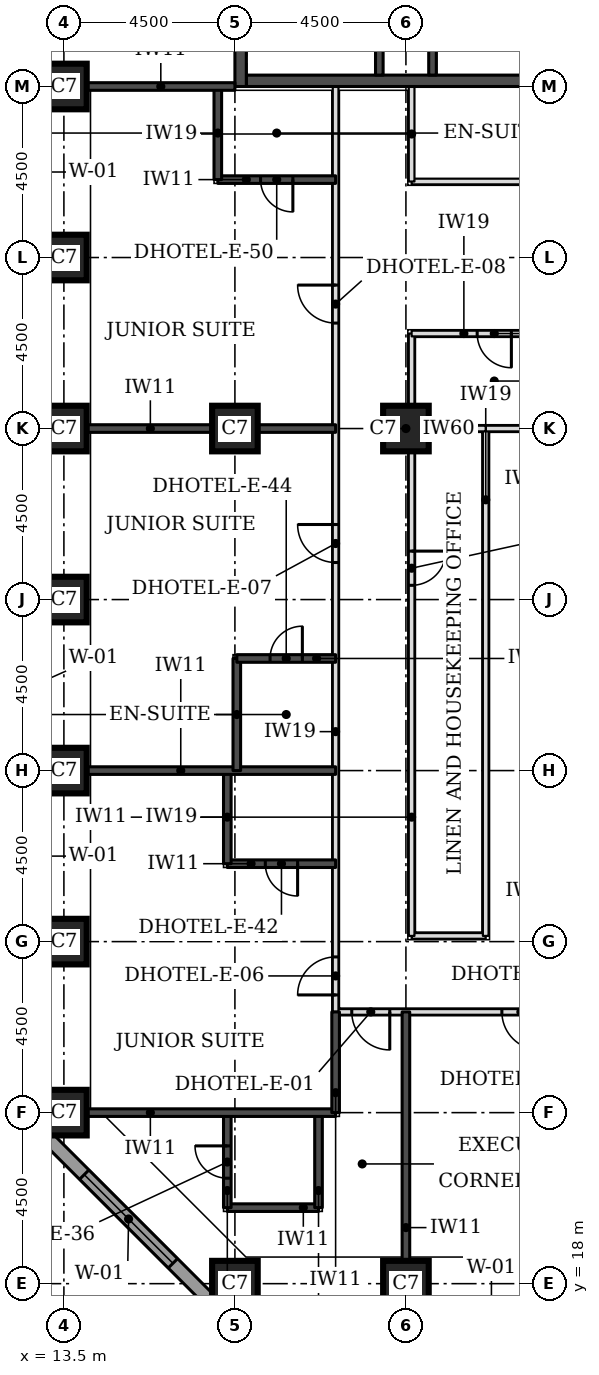
"""IFC4 building model, lengths in metres.
Left out: names, types, materials, properties, quantities, classifications, styles, units other than length and angle.
Written with IfcOpenShell. Run it as: python <this file> out.ifc"""

import sys

from ifc_helpers import new_model, si_unit, direction, frame, frame_2d, origin, origin_2d, place, context, subcontext, project, spatial, rectangle, extrude, element, fill, save


model = new_model("IFC4")
c1 = context("Model", 3, precision=1e-05, world=origin(), true_north=direction((0.0, 1.0)))
c2 = subcontext(c1, "Body", "Model", "MODEL_VIEW")
j1 = project(units=[si_unit("LENGTHUNIT", "METRE"), si_unit("PLANEANGLEUNIT", "RADIAN")], contexts=[c1])
p1 = place(None, origin())
s1 = spatial("IfcSite", under=j1, at=p1, CompositionType="ELEMENT")
p2 = place(p1, origin())
s2 = spatial("IfcBuilding", under=s1, at=p2, CompositionType="ELEMENT")
p3 = place(p2, frame((0.0, 0.0, 39.6)))
s3 = spatial("IfcBuildingStorey", under=s2, at=p3, CompositionType="ELEMENT", Elevation=39.6)
for number, where, z_axis, x_axis in (
    (1, (18.0, 18.0, 0.0), (0.0, 0.0, 1.0), (1.0, 0.0, 0.0)),
    (2, (22.5, 18.0, 0.0), (0.0, 0.0, 1.0), (1.0, 0.0, 0.0)),
    (3, (13.5, 22.5, 0.0), (0.0, 0.0, 1.0), (1.0, 0.0, 0.0)),
    (4, (13.5, 27.0, 0.0), (0.0, 0.0, 1.0), (1.0, 0.0, 0.0)),
    (5, (13.5, 31.5, 0.0), (0.0, 0.0, 1.0), (1.0, 0.0, 0.0)),
    (6, (13.5, 36.0, 0.0), (0.0, 0.0, 1.0), (1.0, 0.0, 0.0)),
    (7, (13.5, 40.5, 0.0), (0.0, 0.0, 1.0), (1.0, 0.0, 0.0)),
    (8, (18.0, 40.5, 0.0), (0.0, 0.0, 1.0), (1.0, 0.0, 0.0)),
    (9, (22.5, 40.5, 0.0), (0.0, 0.0, 1.0), (1.0, 0.0, 0.0)),
    (10, (13.5, 45.0, 0.0), (0.0, 0.0, 1.0), (1.0, 0.0, 0.0)),
    (11, (13.5, 49.5, 0.0), (0.0, 0.0, 1.0), (1.0, 0.0, 0.0)),
):
    element("IfcColumn", number, at=place(p3, frame(where, z_axis=z_axis, x_axis=x_axis)), inside=s3, PredefinedType="COLUMN", context=c2, shape_type="SweptSolid", body=[
        extrude(rectangle(XDim=1.2, YDim=1.2, at=origin_2d()), origin(), (0.0, 0.0, 1.0), 3.3),
    ])
p4 = place(p3, frame((18.3, 49.65, 0.0), z_axis=(0.0, 0.0, 1.0), x_axis=(1.0, 0.0, 0.0)))
e12 = element("IfcWall", 12, at=p4, inside=s3, PredefinedType="SHEAR", context=c2, shape_type="SweptSolid", body=[
    extrude(rectangle(XDim=8.4, YDim=0.3, at=frame_2d((4.2, 0.0))), origin(), (0.0, 0.0, 1.0), 3.3),
])
p5 = place(p3, frame((18.15, 49.5, 0.0), z_axis=(0.0, 0.0, 1.0), x_axis=(0.0, 1.0, 0.0)))
e13 = element("IfcWall", 13, at=p5, inside=s3, PredefinedType="SHEAR", context=c2, shape_type="SweptSolid", body=[
    extrude(rectangle(XDim=9.0, YDim=0.3, at=frame_2d((4.5, 0.0))), origin(), (0.0, 0.0, 1.0), 3.3),
])
p6 = place(p3, frame((12.674, 22.23, 0.0), z_axis=(0.0, 0.0, 1.0), x_axis=(0.707106781187, -0.707106781187, 0.0)))
e14 = element("IfcWall", 14, at=p6, inside=s3, PredefinedType="STANDARD", context=c2, shape_type="SweptSolid", body=[
    extrude(rectangle(XDim=7.151, YDim=0.35, at=frame_2d((3.576, 0.0))), origin(), (0.0, 0.0, 1.0), 3.055),
])
p7 = place(p6, frame((1.926, 0.0, 0.8)))
e15 = element("IfcOpeningElement", 15, at=p7, cuts=e14, PredefinedType="OPENING", context=c2, shape_type="SweptSolid", body=[
    extrude(rectangle(XDim=3.3, YDim=1.5, at=frame_2d((1.65, 0.75))), frame((0.0, 0.185, 0.0), z_axis=(0.0, -1.0, 0.0), x_axis=(1.0, 0.0, 0.0)), (0.0, 0.0, 1.0), 0.37),
])
p8 = place(p3, frame((20.65, 25.15, 0.0), z_axis=(0.0, 0.0, 1.0), x_axis=(1.0, 0.0, 0.0)))
e16 = element("IfcWall", 16, at=p8, inside=s3, PredefinedType="PARTITIONING", context=c2, shape_type="SweptSolid", body=[
    extrude(rectangle(XDim=32.2, YDim=0.15, at=frame_2d((16.1, 0.0))), origin(), (0.0, 0.0, 1.0), 3.08),
])
p9 = place(p8, frame((4.375, 0.0, 0.0)))
e17 = element("IfcOpeningElement", 17, at=p9, cuts=e16, PredefinedType="OPENING", context=c2, shape_type="SweptSolid", body=[
    extrude(rectangle(XDim=1.0, YDim=2.1, at=frame_2d((0.5, 1.05))), frame((0.0, 0.085, 0.0), z_axis=(0.0, -1.0, 0.0), x_axis=(1.0, 0.0, 0.0)), (0.0, 0.0, 1.0), 0.17),
])
p10 = place(p8, frame((16.075, 0.0, 0.0)))
e18 = element("IfcOpeningElement", 18, at=p10, cuts=e16, PredefinedType="OPENING", context=c2, shape_type="SweptSolid", body=[
    extrude(rectangle(XDim=1.0, YDim=2.1, at=frame_2d((0.5, 1.05))), frame((0.0, 0.085, 0.0), z_axis=(0.0, -1.0, 0.0), x_axis=(1.0, 0.0, 0.0)), (0.0, 0.0, 1.0), 0.17),
])
p11 = place(p8, frame((22.375, 0.0, 0.0)))
e19 = element("IfcOpeningElement", 19, at=p11, cuts=e16, PredefinedType="OPENING", context=c2, shape_type="SweptSolid", body=[
    extrude(rectangle(XDim=1.0, YDim=2.1, at=frame_2d((0.5, 1.05))), frame((0.0, 0.085, 0.0), z_axis=(0.0, -1.0, 0.0), x_axis=(1.0, 0.0, 0.0)), (0.0, 0.0, 1.0), 0.17),
])
p12 = place(p8, frame((0.425, 0.0, 0.0)))
e20 = element("IfcOpeningElement", 20, at=p12, cuts=e16, PredefinedType="OPENING", context=c2, shape_type="SweptSolid", body=[
    extrude(rectangle(XDim=1.0, YDim=2.1, at=frame_2d((0.5, 1.05))), frame((0.0, 0.085, 0.0), z_axis=(0.0, -1.0, 0.0), x_axis=(1.0, 0.0, 0.0)), (0.0, 0.0, 1.0), 0.17),
])
p13 = place(p8, frame((30.025, 0.0, 0.0)))
e21 = element("IfcOpeningElement", 21, at=p13, cuts=e16, PredefinedType="OPENING", context=c2, shape_type="SweptSolid", body=[
    extrude(rectangle(XDim=1.0, YDim=2.1, at=frame_2d((0.5, 1.05))), frame((0.0, 0.085, 0.0), z_axis=(0.0, -1.0, 0.0), x_axis=(1.0, 0.0, 0.0)), (0.0, 0.0, 1.0), 0.17),
])
p14 = place(p3, frame((20.65, 25.15, 0.0), z_axis=(0.0, 0.0, 1.0), x_axis=(0.0, 1.0, 0.0)))
e22 = element("IfcWall", 22, at=p14, inside=s3, PredefinedType="PARTITIONING", context=c2, shape_type="SweptSolid", body=[
    extrude(rectangle(XDim=24.35, YDim=0.15, at=frame_2d((12.175, 0.0))), origin(), (0.0, 0.0, 1.0), 3.08),
])
p15 = place(p14, frame((0.447, 0.0, 0.0)))
e23 = element("IfcOpeningElement", 23, at=p15, cuts=e22, PredefinedType="OPENING", context=c2, shape_type="SweptSolid", body=[
    extrude(rectangle(XDim=1.0, YDim=2.1, at=frame_2d((0.5, 1.05))), frame((0.0, 0.085, 0.0), z_axis=(0.0, -1.0, 0.0), x_axis=(1.0, 0.0, 0.0)), (0.0, 0.0, 1.0), 0.17),
])
p16 = place(p14, frame((11.825, 0.0, 0.0)))
e24 = element("IfcOpeningElement", 24, at=p16, cuts=e22, PredefinedType="OPENING", context=c2, shape_type="SweptSolid", body=[
    extrude(rectangle(XDim=1.0, YDim=2.1, at=frame_2d((0.5, 1.05))), frame((0.0, 0.085, 0.0), z_axis=(0.0, -1.0, 0.0), x_axis=(1.0, 0.0, 0.0)), (0.0, 0.0, 1.0), 0.17),
])
p17 = place(p14, frame((18.125, 0.0, 0.0)))
e25 = element("IfcOpeningElement", 25, at=p17, cuts=e22, PredefinedType="OPENING", context=c2, shape_type="SweptSolid", body=[
    extrude(rectangle(XDim=1.0, YDim=2.1, at=frame_2d((0.5, 1.05))), frame((0.0, 0.085, 0.0), z_axis=(0.0, -1.0, 0.0), x_axis=(1.0, 0.0, 0.0)), (0.0, 0.0, 1.0), 0.17),
])
p18 = place(p3, frame((22.65, 27.15, 0.0), z_axis=(0.0, 0.0, 1.0), x_axis=(1.0, 0.0, 0.0)))
e26 = element("IfcWall", 26, at=p18, inside=s3, PredefinedType="PARTITIONING", context=c2, shape_type="SweptSolid", body=[
    extrude(rectangle(XDim=1.95, YDim=0.15, at=frame_2d((0.975, 0.0))), origin(), (0.0, 0.0, 1.0), 3.08),
])
p19 = place(p3, frame((22.65, 27.15, 0.0), z_axis=(0.0, 0.0, 1.0), x_axis=(0.0, 1.0, 0.0)))
e27 = element("IfcWall", 27, at=p19, inside=s3, PredefinedType="PARTITIONING", context=c2, shape_type="SweptSolid", body=[
    extrude(rectangle(XDim=15.85, YDim=0.15, at=frame_2d((7.925, 0.0))), origin(), (0.0, 0.0, 1.0), 3.08),
])
p20 = place(p19, frame((9.225, 0.0, 0.0)))
e28 = element("IfcOpeningElement", 28, at=p20, cuts=e27, PredefinedType="OPENING", context=c2, shape_type="SweptSolid", body=[
    extrude(rectangle(XDim=0.9, YDim=2.1, at=frame_2d((0.45, 1.05))), frame((0.0, 0.085, 0.0), z_axis=(0.0, -1.0, 0.0), x_axis=(1.0, 0.0, 0.0)), (0.0, 0.0, 1.0), 0.17),
])
p21 = place(p3, frame((24.6, 27.15, 0.0), z_axis=(0.0, 0.0, 1.0), x_axis=(0.0, 1.0, 0.0)))
e29 = element("IfcWall", 29, at=p21, inside=s3, PredefinedType="PARTITIONING", context=c2, shape_type="SweptSolid", body=[
    extrude(rectangle(XDim=13.35, YDim=0.15, at=frame_2d((6.675, 0.0))), origin(), (0.0, 0.0, 1.0), 3.08),
])
p22 = place(p3, frame((24.6, 40.5, 0.0), z_axis=(0.0, 0.0, 1.0), x_axis=(1.0, 0.0, 0.0)))
e30 = element("IfcWall", 30, at=p22, inside=s3, PredefinedType="PARTITIONING", context=c2, shape_type="SweptSolid", body=[
    extrude(rectangle(XDim=2.35, YDim=0.15, at=frame_2d((1.175, 0.0))), origin(), (0.0, 0.0, 1.0), 2.33),
])
p23 = place(p3, frame((22.65, 43.0, 0.0), z_axis=(0.0, 0.0, 1.0), x_axis=(1.0, 0.0, 0.0)))
e31 = element("IfcWall", 31, at=p23, inside=s3, PredefinedType="PARTITIONING", context=c2, shape_type="SweptSolid", body=[
    extrude(rectangle(XDim=4.35, YDim=0.15, at=frame_2d((2.175, 0.0))), origin(), (0.0, 0.0, 1.0), 3.08),
])
p24 = place(p23, frame((1.725, 0.0, 0.0)))
e32 = element("IfcOpeningElement", 32, at=p24, cuts=e31, PredefinedType="OPENING", context=c2, shape_type="SweptSolid", body=[
    extrude(rectangle(XDim=0.9, YDim=2.1, at=frame_2d((0.45, 1.05))), frame((0.0, 0.085, 0.0), z_axis=(0.0, -1.0, 0.0), x_axis=(1.0, 0.0, 0.0)), (0.0, 0.0, 1.0), 0.17),
])
p25 = place(p3, frame((22.65, 47.0, 0.0), z_axis=(0.0, 0.0, 1.0), x_axis=(1.0, 0.0, 0.0)))
e33 = element("IfcWall", 33, at=p25, inside=s3, PredefinedType="PARTITIONING", context=c2, shape_type="SweptSolid", body=[
    extrude(rectangle(XDim=4.35, YDim=0.15, at=frame_2d((2.175, 0.0))), origin(), (0.0, 0.0, 1.0), 3.08),
])
p26 = place(p3, frame((22.65, 47.0, 0.0), z_axis=(0.0, 0.0, 1.0), x_axis=(0.0, 1.0, 0.0)))
e34 = element("IfcWall", 34, at=p26, inside=s3, PredefinedType="PARTITIONING", context=c2, shape_type="SweptSolid", body=[
    extrude(rectangle(XDim=2.5, YDim=0.15, at=frame_2d((1.25, 0.0))), origin(), (0.0, 0.0, 1.0), 3.08),
])
p27 = place(p3, frame((22.5, 18.6, 0.0), z_axis=(0.0, 0.0, 1.0), x_axis=(0.0, 1.0, 0.0)))
e35 = element("IfcWall", 35, at=p27, inside=s3, PredefinedType="SOLIDWALL", context=c2, shape_type="SweptSolid", body=[
    extrude(rectangle(XDim=6.55, YDim=0.2, at=frame_2d((3.275, 0.0))), origin(), (0.0, 0.0, 1.0), 3.08),
])
p28 = place(p3, frame((17.8, 20.0, 0.0), z_axis=(0.0, 0.0, 1.0), x_axis=(1.0, 0.0, 0.0)))
e36 = element("IfcWall", 36, at=p28, inside=s3, PredefinedType="SOLIDWALL", context=c2, shape_type="SweptSolid", body=[
    extrude(rectangle(XDim=2.4, YDim=0.2, at=frame_2d((1.2, 0.0))), origin(), (0.0, 0.0, 1.0), 3.08),
])
p29 = place(p3, frame((17.8, 20.0, 0.0), z_axis=(0.0, 0.0, 1.0), x_axis=(0.0, 1.0, 0.0)))
e37 = element("IfcWall", 37, at=p29, inside=s3, PredefinedType="SOLIDWALL", context=c2, shape_type="SweptSolid", body=[
    extrude(rectangle(XDim=2.5, YDim=0.2, at=frame_2d((1.25, 0.0))), origin(), (0.0, 0.0, 1.0), 3.08),
])
p30 = place(p29, frame((0.775, 0.0, 0.0)))
e38 = element("IfcOpeningElement", 38, at=p30, cuts=e37, PredefinedType="OPENING", context=c2, shape_type="SweptSolid", body=[
    extrude(rectangle(XDim=0.85, YDim=2.1, at=frame_2d((0.425, 1.05))), frame((0.0, 0.11, 0.0), z_axis=(0.0, -1.0, 0.0), x_axis=(1.0, 0.0, 0.0)), (0.0, 0.0, 1.0), 0.22),
])
p31 = place(p3, frame((20.2, 20.0, 0.0), z_axis=(0.0, 0.0, 1.0), x_axis=(0.0, 1.0, 0.0)))
e39 = element("IfcWall", 39, at=p31, inside=s3, PredefinedType="SOLIDWALL", context=c2, shape_type="SweptSolid", body=[
    extrude(rectangle(XDim=2.5, YDim=0.2, at=frame_2d((1.25, 0.0))), origin(), (0.0, 0.0, 1.0), 3.08),
])
p32 = place(p3, frame((14.1, 22.5, 0.0), z_axis=(0.0, 0.0, 1.0), x_axis=(1.0, 0.0, 0.0)))
e40 = element("IfcWall", 40, at=p32, inside=s3, PredefinedType="SOLIDWALL", context=c2, shape_type="SweptSolid", body=[
    extrude(rectangle(XDim=6.55, YDim=0.2, at=frame_2d((3.275, 0.0))), origin(), (0.0, 0.0, 1.0), 3.08),
])
p33 = place(p3, frame((20.65, 22.5, 0.0), z_axis=(0.0, 0.0, 1.0), x_axis=(0.0, 1.0, 0.0)))
e41 = element("IfcWall", 41, at=p33, inside=s3, PredefinedType="SOLIDWALL", context=c2, shape_type="SweptSolid", body=[
    extrude(rectangle(XDim=2.65, YDim=0.2, at=frame_2d((1.325, 0.0))), origin(), (0.0, 0.0, 1.0), 3.08),
])
p34 = place(p3, frame((17.8, 29.05, 0.0), z_axis=(0.0, 0.0, 1.0), x_axis=(1.0, 0.0, 0.0)))
e42 = element("IfcWall", 42, at=p34, inside=s3, PredefinedType="SOLIDWALL", context=c2, shape_type="SweptSolid", body=[
    extrude(rectangle(XDim=2.85, YDim=0.2, at=frame_2d((1.425, 0.0))), origin(), (0.0, 0.0, 1.0), 3.08),
])
p35 = place(p34, frame((1.0, 0.0, 0.0)))
e43 = element("IfcOpeningElement", 43, at=p35, cuts=e42, PredefinedType="OPENING", context=c2, shape_type="SweptSolid", body=[
    extrude(rectangle(XDim=0.85, YDim=2.1, at=frame_2d((0.425, 1.05))), frame((0.0, 0.11, 0.0), z_axis=(0.0, -1.0, 0.0), x_axis=(1.0, 0.0, 0.0)), (0.0, 0.0, 1.0), 0.22),
])
p36 = place(p3, frame((17.8, 29.05, 0.0), z_axis=(0.0, 0.0, 1.0), x_axis=(0.0, 1.0, 0.0)))
e44 = element("IfcWall", 44, at=p36, inside=s3, PredefinedType="SOLIDWALL", context=c2, shape_type="SweptSolid", body=[
    extrude(rectangle(XDim=2.45, YDim=0.2, at=frame_2d((1.225, 0.0))), origin(), (0.0, 0.0, 1.0), 3.08),
])
p37 = place(p3, frame((14.1, 31.5, 0.0), z_axis=(0.0, 0.0, 1.0), x_axis=(1.0, 0.0, 0.0)))
e45 = element("IfcWall", 45, at=p37, inside=s3, PredefinedType="SOLIDWALL", context=c2, shape_type="SweptSolid", body=[
    extrude(rectangle(XDim=6.55, YDim=0.2, at=frame_2d((3.275, 0.0))), origin(), (0.0, 0.0, 1.0), 3.08),
])
p38 = place(p3, frame((18.05, 31.5, 0.0), z_axis=(0.0, 0.0, 1.0), x_axis=(0.0, 1.0, 0.0)))
e46 = element("IfcWall", 46, at=p38, inside=s3, PredefinedType="SOLIDWALL", context=c2, shape_type="SweptSolid", body=[
    extrude(rectangle(XDim=2.95, YDim=0.2, at=frame_2d((1.475, 0.0))), origin(), (0.0, 0.0, 1.0), 3.08),
])
p39 = place(p3, frame((18.05, 34.45, 0.0), z_axis=(0.0, 0.0, 1.0), x_axis=(1.0, 0.0, 0.0)))
e47 = element("IfcWall", 47, at=p39, inside=s3, PredefinedType="SOLIDWALL", context=c2, shape_type="SweptSolid", body=[
    extrude(rectangle(XDim=2.6, YDim=0.2, at=frame_2d((1.3, 0.0))), origin(), (0.0, 0.0, 1.0), 3.08),
])
p40 = place(p39, frame((0.875, 0.0, 0.0)))
e48 = element("IfcOpeningElement", 48, at=p40, cuts=e47, PredefinedType="OPENING", context=c2, shape_type="SweptSolid", body=[
    extrude(rectangle(XDim=0.85, YDim=2.1, at=frame_2d((0.425, 1.05))), frame((0.0, 0.11, 0.0), z_axis=(0.0, -1.0, 0.0), x_axis=(1.0, 0.0, 0.0)), (0.0, 0.0, 1.0), 0.22),
])
p41 = place(p3, frame((14.1, 40.5, 0.0), z_axis=(0.0, 0.0, 1.0), x_axis=(1.0, 0.0, 0.0)))
e49 = element("IfcWall", 49, at=p41, inside=s3, PredefinedType="SOLIDWALL", context=c2, shape_type="SweptSolid", body=[
    extrude(rectangle(XDim=6.55, YDim=0.2, at=frame_2d((3.275, 0.0))), origin(), (0.0, 0.0, 1.0), 3.08),
])
p42 = place(p3, frame((17.55, 47.05, 0.0), z_axis=(0.0, 0.0, 1.0), x_axis=(1.0, 0.0, 0.0)))
e50 = element("IfcWall", 50, at=p42, inside=s3, PredefinedType="SOLIDWALL", context=c2, shape_type="SweptSolid", body=[
    extrude(rectangle(XDim=3.1, YDim=0.2, at=frame_2d((1.55, 0.0))), origin(), (0.0, 0.0, 1.0), 3.08),
])
p43 = place(p42, frame((1.125, 0.0, 0.0)))
e51 = element("IfcOpeningElement", 51, at=p43, cuts=e50, PredefinedType="OPENING", context=c2, shape_type="SweptSolid", body=[
    extrude(rectangle(XDim=0.85, YDim=2.1, at=frame_2d((0.425, 1.05))), frame((0.0, 0.11, 0.0), z_axis=(0.0, -1.0, 0.0), x_axis=(1.0, 0.0, 0.0)), (0.0, 0.0, 1.0), 0.22),
])
p44 = place(p3, frame((17.55, 47.05, 0.0), z_axis=(0.0, 0.0, 1.0), x_axis=(0.0, 1.0, 0.0)))
e52 = element("IfcWall", 52, at=p44, inside=s3, PredefinedType="SOLIDWALL", context=c2, shape_type="SweptSolid", body=[
    extrude(rectangle(XDim=2.45, YDim=0.2, at=frame_2d((1.225, 0.0))), origin(), (0.0, 0.0, 1.0), 3.08),
])
p45 = place(p3, frame((14.1, 49.5, 0.0), z_axis=(0.0, 0.0, 1.0), x_axis=(1.0, 0.0, 0.0)))
e53 = element("IfcWall", 53, at=p45, inside=s3, PredefinedType="SOLIDWALL", context=c2, shape_type="SweptSolid", body=[
    extrude(rectangle(XDim=3.9, YDim=0.2, at=frame_2d((1.95, 0.0))), origin(), (0.0, 0.0, 1.0), 3.08),
])
p46 = place(p3, frame((22.65, 40.5, 0.0), z_axis=(0.0, 0.0, 1.0), x_axis=(1.0, 0.0, 0.0)))
e54 = element("IfcWall", 54, at=p46, inside=s3, PredefinedType="PARTITIONING", context=c2, shape_type="SweptSolid", body=[
    extrude(rectangle(XDim=1.95, YDim=0.15, at=frame_2d((0.975, 0.0))), origin(), (0.0, 0.0, 1.0), 2.33),
])
for number, where, z_axis, x_axis in (
    (55, (21.8, 49.8, 0.0), (0.0, 0.0, 1.0), (0.0, 1.0, 0.0)),
    (56, (23.2, 49.8, 0.0), (0.0, 0.0, 1.0), (0.0, 1.0, 0.0)),
):
    element("IfcWall", number, at=place(p3, frame(where, z_axis=z_axis, x_axis=x_axis)), inside=s3, PredefinedType="SOLIDWALL", context=c2, shape_type="SweptSolid", body=[
        extrude(rectangle(XDim=6.05, YDim=0.2, at=frame_2d((3.025, 0.0))), origin(), (0.0, 0.0, 1.0), 3.08),
    ])
p47 = place(p7, origin())
e57 = element("IfcWindow", 57, at=p47, inside=s3, PartitioningType="SINGLE_PANEL", PredefinedType="WINDOW", context=c2, shape_type="SweptSolid", body=[
    extrude(rectangle(XDim=3.3, YDim=1.5, at=frame_2d((1.65, 0.75))), frame((0.0, 0.085, 0.0), z_axis=(0.0, -1.0, 0.0), x_axis=(1.0, 0.0, 0.0)), (0.0, 0.0, 1.0), 0.06),
])
fill(e15, e57)
p48 = place(p9, frame((1.0, 0.0, 0.0), z_axis=(0.0, 0.0, 1.0), x_axis=(-1.0, 0.0, 0.0)))
e58 = element("IfcDoor", 58, at=p48, inside=s3, OperationType="SINGLE_SWING_LEFT", PredefinedType="DOOR", context=c2, shape_type="SweptSolid", body=[
    extrude(rectangle(XDim=1.0, YDim=2.1, at=frame_2d((0.5, 1.05))), frame((0.0, 0.025, 0.0), z_axis=(0.0, -1.0, 0.0), x_axis=(1.0, 0.0, 0.0)), (0.0, 0.0, 1.0), 0.05),
])
fill(e17, e58)
p49 = place(p15, origin())
e59 = element("IfcDoor", 59, at=p49, inside=s3, OperationType="SINGLE_SWING_LEFT", PredefinedType="DOOR", context=c2, shape_type="SweptSolid", body=[
    extrude(rectangle(XDim=1.0, YDim=2.1, at=frame_2d((0.5, 1.05))), frame((0.0, 0.025, 0.0), z_axis=(0.0, -1.0, 0.0), x_axis=(1.0, 0.0, 0.0)), (0.0, 0.0, 1.0), 0.05),
])
fill(e23, e59)
p50 = place(p35, frame((0.85, 0.0, 0.0), z_axis=(0.0, 0.0, 1.0), x_axis=(-1.0, 0.0, 0.0)))
e60 = element("IfcDoor", 60, at=p50, inside=s3, OperationType="SINGLE_SWING_LEFT", PredefinedType="DOOR", context=c2, shape_type="SweptSolid", body=[
    extrude(rectangle(XDim=0.85, YDim=2.1, at=frame_2d((0.425, 1.05))), frame((0.0, 0.025, 0.0), z_axis=(0.0, -1.0, 0.0), x_axis=(1.0, 0.0, 0.0)), (0.0, 0.0, 1.0), 0.05),
])
fill(e43, e60)
p51 = place(p16, origin())
e61 = element("IfcDoor", 61, at=p51, inside=s3, OperationType="SINGLE_SWING_RIGHT", PredefinedType="DOOR", context=c2, shape_type="SweptSolid", body=[
    extrude(rectangle(XDim=1.0, YDim=2.1, at=frame_2d((0.5, 1.05))), frame((0.0, 0.025, 0.0), z_axis=(0.0, -1.0, 0.0), x_axis=(1.0, 0.0, 0.0)), (0.0, 0.0, 1.0), 0.05),
])
fill(e24, e61)
p52 = place(p40, origin())
e62 = element("IfcDoor", 62, at=p52, inside=s3, OperationType="SINGLE_SWING_RIGHT", PredefinedType="DOOR", context=c2, shape_type="SweptSolid", body=[
    extrude(rectangle(XDim=0.85, YDim=2.1, at=frame_2d((0.425, 1.05))), frame((0.0, 0.025, 0.0), z_axis=(0.0, -1.0, 0.0), x_axis=(1.0, 0.0, 0.0)), (0.0, 0.0, 1.0), 0.05),
])
fill(e48, e62)
p53 = place(p17, origin())
e63 = element("IfcDoor", 63, at=p53, inside=s3, OperationType="SINGLE_SWING_RIGHT", PredefinedType="DOOR", context=c2, shape_type="SweptSolid", body=[
    extrude(rectangle(XDim=1.0, YDim=2.1, at=frame_2d((0.5, 1.05))), frame((0.0, 0.025, 0.0), z_axis=(0.0, -1.0, 0.0), x_axis=(1.0, 0.0, 0.0)), (0.0, 0.0, 1.0), 0.05),
])
fill(e25, e63)
p54 = place(p43, frame((0.85, 0.0, 0.0), z_axis=(0.0, 0.0, 1.0), x_axis=(-1.0, 0.0, 0.0)))
e64 = element("IfcDoor", 64, at=p54, inside=s3, OperationType="SINGLE_SWING_LEFT", PredefinedType="DOOR", context=c2, shape_type="SweptSolid", body=[
    extrude(rectangle(XDim=0.85, YDim=2.1, at=frame_2d((0.425, 1.05))), frame((0.0, 0.025, 0.0), z_axis=(0.0, -1.0, 0.0), x_axis=(1.0, 0.0, 0.0)), (0.0, 0.0, 1.0), 0.05),
])
fill(e51, e64)
p55 = place(p12, frame((1.0, 0.0, 0.0), z_axis=(0.0, 0.0, 1.0), x_axis=(-1.0, 0.0, 0.0)))
e65 = element("IfcDoor", 65, at=p55, inside=s3, OperationType="SINGLE_SWING_LEFT", PredefinedType="DOOR", context=c2, shape_type="SweptSolid", body=[
    extrude(rectangle(XDim=1.0, YDim=2.1, at=frame_2d((0.5, 1.05))), frame((0.0, 0.025, 0.0), z_axis=(0.0, -1.0, 0.0), x_axis=(1.0, 0.0, 0.0)), (0.0, 0.0, 1.0), 0.05),
])
fill(e20, e65)
p56 = place(p30, origin())
e66 = element("IfcDoor", 66, at=p56, inside=s3, OperationType="SINGLE_SWING_RIGHT", PredefinedType="DOOR", context=c2, shape_type="SweptSolid", body=[
    extrude(rectangle(XDim=0.85, YDim=2.1, at=frame_2d((0.425, 1.05))), frame((0.0, 0.025, 0.0), z_axis=(0.0, -1.0, 0.0), x_axis=(1.0, 0.0, 0.0)), (0.0, 0.0, 1.0), 0.05),
])
fill(e38, e66)
p57 = place(p20, frame((0.9, 0.0, 0.0), z_axis=(0.0, 0.0, 1.0), x_axis=(-1.0, 0.0, 0.0)))
e67 = element("IfcDoor", 67, at=p57, inside=s3, OperationType="SINGLE_SWING_LEFT", PredefinedType="DOOR", context=c2, shape_type="SweptSolid", body=[
    extrude(rectangle(XDim=0.9, YDim=2.1, at=frame_2d((0.45, 1.05))), frame((0.0, 0.025, 0.0), z_axis=(0.0, -1.0, 0.0), x_axis=(1.0, 0.0, 0.0)), (0.0, 0.0, 1.0), 0.05),
])
fill(e28, e67)
p58 = place(p24, frame((0.9, 0.0, 0.0), z_axis=(0.0, 0.0, 1.0), x_axis=(-1.0, 0.0, 0.0)))
e68 = element("IfcDoor", 68, at=p58, inside=s3, OperationType="SINGLE_SWING_LEFT", PredefinedType="DOOR", context=c2, shape_type="SweptSolid", body=[
    extrude(rectangle(XDim=0.9, YDim=2.1, at=frame_2d((0.45, 1.05))), frame((0.0, 0.025, 0.0), z_axis=(0.0, -1.0, 0.0), x_axis=(1.0, 0.0, 0.0)), (0.0, 0.0, 1.0), 0.05),
])
fill(e32, e68)
save(model, sys.argv[1])
